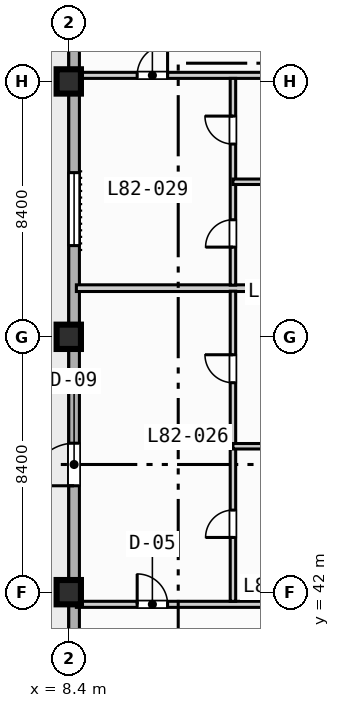
"""IFC4 building model, lengths in metres.
Left out: names, types, materials, properties, quantities, classifications, styles, units other than length and angle.
Written with IfcOpenShell. Run it as: python <this file> out.ifc"""

import sys

from ifc_helpers import new_model, si_unit, direction, frame, frame_2d, origin, origin_2d, place, context, subcontext, project, spatial, rectangle, extrude, element, fill, save


model = new_model("IFC4")
c1 = context("Model", 3, precision=1e-05, world=origin(), true_north=direction((0.0, 1.0)))
c2 = subcontext(c1, "Body", "Model", "MODEL_VIEW")
j1 = project(units=[si_unit("LENGTHUNIT", "METRE"), si_unit("PLANEANGLEUNIT", "RADIAN")], contexts=[c1])
p1 = place(None, origin())
s1 = spatial("IfcSite", under=j1, at=p1, CompositionType="ELEMENT")
p2 = place(p1, origin())
s2 = spatial("IfcBuilding", under=s1, at=p2, CompositionType="ELEMENT")
p3 = place(p2, frame((0.0, 0.0, 332.0)))
s3 = spatial("IfcBuildingStorey", under=s2, at=p3, CompositionType="ELEMENT", Elevation=332.0)
for number, where, z_axis, x_axis in (
    (1, (8.4, 42.0, 0.0), (0.0, 0.0, 1.0), (1.0, 0.0, 0.0)),
    (2, (8.4, 50.4, 0.0), (0.0, 0.0, 1.0), (1.0, 0.0, 0.0)),
    (3, (8.4, 58.8, 0.0), (0.0, 0.0, 1.0), (1.0, 0.0, 0.0)),
):
    element("IfcColumn", number, at=place(p3, frame(where, z_axis=z_axis, x_axis=x_axis)), inside=s3, PredefinedType="COLUMN", context=c2, shape_type="SweptSolid", body=[
        extrude(rectangle(XDim=0.8, YDim=0.8, at=origin_2d()), origin(), (0.0, 0.0, 1.0), 3.9),
    ])
p4 = place(p3, frame((8.575, 11.575, 0.0), z_axis=(0.0, 0.0, 1.0), x_axis=(0.0, 1.0, 0.0)))
e4 = element("IfcWall", 4, at=p4, inside=s3, PredefinedType="STANDARD", context=c2, shape_type="SweptSolid", body=[
    extrude(rectangle(XDim=60.85, YDim=0.35, at=frame_2d((30.425, 0.0))), origin(), (0.0, 0.0, 1.0), 3.67),
])
p5 = place(p4, frame((33.925, 0.0, 0.0)))
e5 = element("IfcOpeningElement", 5, at=p5, cuts=e4, PredefinedType="OPENING", context=c2, shape_type="SweptSolid", body=[
    extrude(rectangle(XDim=1.4, YDim=2.2, at=frame_2d((0.7, 1.1))), frame((0.0, 0.185, 0.0), z_axis=(0.0, -1.0, 0.0), x_axis=(1.0, 0.0, 0.0)), (0.0, 0.0, 1.0), 0.37),
])
p6 = place(p4, frame((16.925, 0.0, 0.85)))
e6 = element("IfcOpeningElement", 6, at=p6, cuts=e4, PredefinedType="OPENING", context=c2, shape_type="SweptSolid", body=[
    extrude(rectangle(XDim=1.8, YDim=1.8, at=frame_2d((0.9, 0.9))), frame((0.0, 0.185, 0.0), z_axis=(0.0, -1.0, 0.0), x_axis=(1.0, 0.0, 0.0)), (0.0, 0.0, 1.0), 0.37),
])
p7 = place(p4, frame((25.025, 0.0, 0.85)))
e7 = element("IfcOpeningElement", 7, at=p7, cuts=e4, PredefinedType="OPENING", context=c2, shape_type="SweptSolid", body=[
    extrude(rectangle(XDim=2.4, YDim=1.95, at=frame_2d((1.2, 0.975))), frame((0.0, 0.185, 0.0), z_axis=(0.0, -1.0, 0.0), x_axis=(1.0, 0.0, 0.0)), (0.0, 0.0, 1.0), 0.37),
])
p8 = place(p4, frame((41.825, 0.0, 0.85)))
e8 = element("IfcOpeningElement", 8, at=p8, cuts=e4, PredefinedType="OPENING", context=c2, shape_type="SweptSolid", body=[
    extrude(rectangle(XDim=2.4, YDim=1.95, at=frame_2d((1.2, 0.975))), frame((0.0, 0.185, 0.0), z_axis=(0.0, -1.0, 0.0), x_axis=(1.0, 0.0, 0.0)), (0.0, 0.0, 1.0), 0.37),
])
p9 = place(p3, frame((8.65, 41.6, 0.0), z_axis=(0.0, 0.0, 1.0), x_axis=(1.0, 0.0, 0.0)))
e9 = element("IfcWall", 9, at=p9, inside=s3, PredefinedType="PARTITIONING", context=c2, shape_type="SweptSolid", body=[
    extrude(rectangle(XDim=7.95, YDim=0.2, at=frame_2d((3.975, 0.0))), origin(), (0.0, 0.0, 1.0), 3.67),
])
p10 = place(p9, frame((2.0, 0.0, 0.0)))
e10 = element("IfcOpeningElement", 10, at=p10, cuts=e9, PredefinedType="OPENING", context=c2, shape_type="SweptSolid", body=[
    extrude(rectangle(XDim=1.0, YDim=2.15, at=frame_2d((0.5, 1.075))), frame((0.0, 0.11, 0.0), z_axis=(0.0, -1.0, 0.0), x_axis=(1.0, 0.0, 0.0)), (0.0, 0.0, 1.0), 0.22),
])
p11 = place(p3, frame((8.65, 59.0, 0.0), z_axis=(0.0, 0.0, 1.0), x_axis=(1.0, 0.0, 0.0)))
e11 = element("IfcWall", 11, at=p11, inside=s3, PredefinedType="PARTITIONING", context=c2, shape_type="SweptSolid", body=[
    extrude(rectangle(XDim=7.95, YDim=0.2, at=frame_2d((3.975, 0.0))), origin(), (0.0, 0.0, 1.0), 3.07),
])
p12 = place(p11, frame((2.0, 0.0, 0.0)))
e12 = element("IfcOpeningElement", 12, at=p12, cuts=e11, PredefinedType="OPENING", context=c2, shape_type="SweptSolid", body=[
    extrude(rectangle(XDim=1.0, YDim=2.15, at=frame_2d((0.5, 1.075))), frame((0.0, 0.11, 0.0), z_axis=(0.0, -1.0, 0.0), x_axis=(1.0, 0.0, 0.0)), (0.0, 0.0, 1.0), 0.22),
])
p13 = place(p3, frame((8.65, 52.0, 0.0), z_axis=(0.0, 0.0, 1.0), x_axis=(1.0, 0.0, 0.0)))
e13 = element("IfcWall", 13, at=p13, inside=s3, PredefinedType="PARTITIONING", context=c2, shape_type="SweptSolid", body=[
    extrude(rectangle(XDim=7.95, YDim=0.22, at=frame_2d((3.975, 0.0))), origin(), (0.0, 0.0, 1.0), 3.67),
])
p14 = place(p3, frame((13.8, 41.7, 0.0), z_axis=(0.0, 0.0, 1.0), x_axis=(0.0, 1.0, 0.0)))
e14 = element("IfcWall", 14, at=p14, inside=s3, PredefinedType="PLUMBINGWALL", context=c2, shape_type="SweptSolid", body=[
    extrude(rectangle(XDim=10.2, YDim=0.18, at=frame_2d((5.1, 0.0))), origin(), (0.0, 0.0, 1.0), 3.67),
])
p15 = place(p14, frame((2.1, 0.0, 0.0)))
e15 = element("IfcOpeningElement", 15, at=p15, cuts=e14, PredefinedType="OPENING", context=c2, shape_type="SweptSolid", body=[
    extrude(rectangle(XDim=0.9, YDim=2.1, at=frame_2d((0.45, 1.05))), frame((0.0, 0.1, 0.0), z_axis=(0.0, -1.0, 0.0), x_axis=(1.0, 0.0, 0.0)), (0.0, 0.0, 1.0), 0.2),
])
p16 = place(p14, frame((7.19, 0.0, 0.0)))
e16 = element("IfcOpeningElement", 16, at=p16, cuts=e14, PredefinedType="OPENING", context=c2, shape_type="SweptSolid", body=[
    extrude(rectangle(XDim=0.92, YDim=2.1, at=frame_2d((0.46, 1.05))), frame((0.0, 0.1, 0.0), z_axis=(0.0, -1.0, 0.0), x_axis=(1.0, 0.0, 0.0)), (0.0, 0.0, 1.0), 0.2),
])
p17 = place(p3, frame((13.8, 46.8, 0.0), z_axis=(0.0, 0.0, 1.0), x_axis=(1.0, 0.0, 0.0)))
e17 = element("IfcWall", 17, at=p17, inside=s3, PredefinedType="PLUMBINGWALL", context=c2, shape_type="SweptSolid", body=[
    extrude(rectangle(XDim=2.8, YDim=0.18, at=frame_2d((1.4, 0.0))), origin(), (0.0, 0.0, 1.0), 3.67),
])
p18 = place(p3, frame((13.8, 52.1, 0.0), z_axis=(0.0, 0.0, 1.0), x_axis=(0.0, 1.0, 0.0)))
e18 = element("IfcWall", 18, at=p18, inside=s3, PredefinedType="PLUMBINGWALL", context=c2, shape_type="SweptSolid", body=[
    extrude(rectangle(XDim=6.8, YDim=0.18, at=frame_2d((3.4, 0.0))), origin(), (0.0, 0.0, 1.0), 3.67),
])
p19 = place(p18, frame((1.25, 0.0, 0.0)))
e19 = element("IfcOpeningElement", 19, at=p19, cuts=e18, PredefinedType="OPENING", context=c2, shape_type="SweptSolid", body=[
    extrude(rectangle(XDim=0.9, YDim=2.1, at=frame_2d((0.45, 1.05))), frame((0.0, 0.1, 0.0), z_axis=(0.0, -1.0, 0.0), x_axis=(1.0, 0.0, 0.0)), (0.0, 0.0, 1.0), 0.2),
])
p20 = place(p18, frame((4.64, 0.0, 0.0)))
e20 = element("IfcOpeningElement", 20, at=p20, cuts=e18, PredefinedType="OPENING", context=c2, shape_type="SweptSolid", body=[
    extrude(rectangle(XDim=0.92, YDim=2.1, at=frame_2d((0.46, 1.05))), frame((0.0, 0.1, 0.0), z_axis=(0.0, -1.0, 0.0), x_axis=(1.0, 0.0, 0.0)), (0.0, 0.0, 1.0), 0.2),
])
p21 = place(p3, frame((13.8, 55.5, 0.0), z_axis=(0.0, 0.0, 1.0), x_axis=(1.0, 0.0, 0.0)))
e21 = element("IfcWall", 21, at=p21, inside=s3, PredefinedType="PLUMBINGWALL", context=c2, shape_type="SweptSolid", body=[
    extrude(rectangle(XDim=2.8, YDim=0.18, at=frame_2d((1.4, 0.0))), origin(), (0.0, 0.0, 1.0), 3.67),
])
p22 = place(p5, origin())
e22 = element("IfcDoor", 22, at=p22, inside=s3, OperationType="SINGLE_SWING_LEFT", PredefinedType="DOOR", context=c2, shape_type="SweptSolid", body=[
    extrude(rectangle(XDim=1.4, YDim=2.2, at=frame_2d((0.7, 1.1))), frame((0.0, 0.025, 0.0), z_axis=(0.0, -1.0, 0.0), x_axis=(1.0, 0.0, 0.0)), (0.0, 0.0, 1.0), 0.05),
])
fill(e5, e22)
p23 = place(p8, origin())
e23 = element("IfcWindow", 23, at=p23, inside=s3, PartitioningType="SINGLE_PANEL", PredefinedType="WINDOW", context=c2, shape_type="SweptSolid", body=[
    extrude(rectangle(XDim=2.4, YDim=1.95, at=frame_2d((1.2, 0.975))), frame((0.0, 0.03, 0.0), z_axis=(0.0, -1.0, 0.0), x_axis=(1.0, 0.0, 0.0)), (0.0, 0.0, 1.0), 0.06),
])
fill(e8, e23)
p24 = place(p10, origin())
e24 = element("IfcDoor", 24, at=p24, inside=s3, OperationType="SINGLE_SWING_LEFT", PredefinedType="DOOR", context=c2, shape_type="SweptSolid", body=[
    extrude(rectangle(XDim=1.0, YDim=2.15, at=frame_2d((0.5, 1.075))), frame((0.0, 0.025, 0.0), z_axis=(0.0, -1.0, 0.0), x_axis=(1.0, 0.0, 0.0)), (0.0, 0.0, 1.0), 0.05),
])
fill(e10, e24)
p25 = place(p12, origin())
e25 = element("IfcDoor", 25, at=p25, inside=s3, OperationType="SINGLE_SWING_RIGHT", PredefinedType="DOOR", context=c2, shape_type="SweptSolid", body=[
    extrude(rectangle(XDim=1.0, YDim=2.15, at=frame_2d((0.5, 1.075))), frame((0.0, 0.025, 0.0), z_axis=(0.0, -1.0, 0.0), x_axis=(1.0, 0.0, 0.0)), (0.0, 0.0, 1.0), 0.05),
])
fill(e12, e25)
p26 = place(p15, origin())
e26 = element("IfcDoor", 26, at=p26, inside=s3, OperationType="SINGLE_SWING_LEFT", PredefinedType="DOOR", context=c2, shape_type="SweptSolid", body=[
    extrude(rectangle(XDim=0.9, YDim=2.1, at=frame_2d((0.45, 1.05))), frame((0.0, 0.025, 0.0), z_axis=(0.0, -1.0, 0.0), x_axis=(1.0, 0.0, 0.0)), (0.0, 0.0, 1.0), 0.05),
])
fill(e15, e26)
p27 = place(p16, origin())
e27 = element("IfcDoor", 27, at=p27, inside=s3, OperationType="SINGLE_SWING_RIGHT", PredefinedType="DOOR", context=c2, shape_type="SweptSolid", body=[
    extrude(rectangle(XDim=0.92, YDim=2.1, at=frame_2d((0.46, 1.05))), frame((0.0, 0.025, 0.0), z_axis=(0.0, -1.0, 0.0), x_axis=(1.0, 0.0, 0.0)), (0.0, 0.0, 1.0), 0.05),
])
fill(e16, e27)
p28 = place(p19, origin())
e28 = element("IfcDoor", 28, at=p28, inside=s3, OperationType="SINGLE_SWING_LEFT", PredefinedType="DOOR", context=c2, shape_type="SweptSolid", body=[
    extrude(rectangle(XDim=0.9, YDim=2.1, at=frame_2d((0.45, 1.05))), frame((0.0, 0.025, 0.0), z_axis=(0.0, -1.0, 0.0), x_axis=(1.0, 0.0, 0.0)), (0.0, 0.0, 1.0), 0.05),
])
fill(e19, e28)
p29 = place(p20, origin())
e29 = element("IfcDoor", 29, at=p29, inside=s3, OperationType="SINGLE_SWING_RIGHT", PredefinedType="DOOR", context=c2, shape_type="SweptSolid", body=[
    extrude(rectangle(XDim=0.92, YDim=2.1, at=frame_2d((0.46, 1.05))), frame((0.0, 0.025, 0.0), z_axis=(0.0, -1.0, 0.0), x_axis=(1.0, 0.0, 0.0)), (0.0, 0.0, 1.0), 0.05),
])
fill(e20, e29)
save(model, sys.argv[1])
